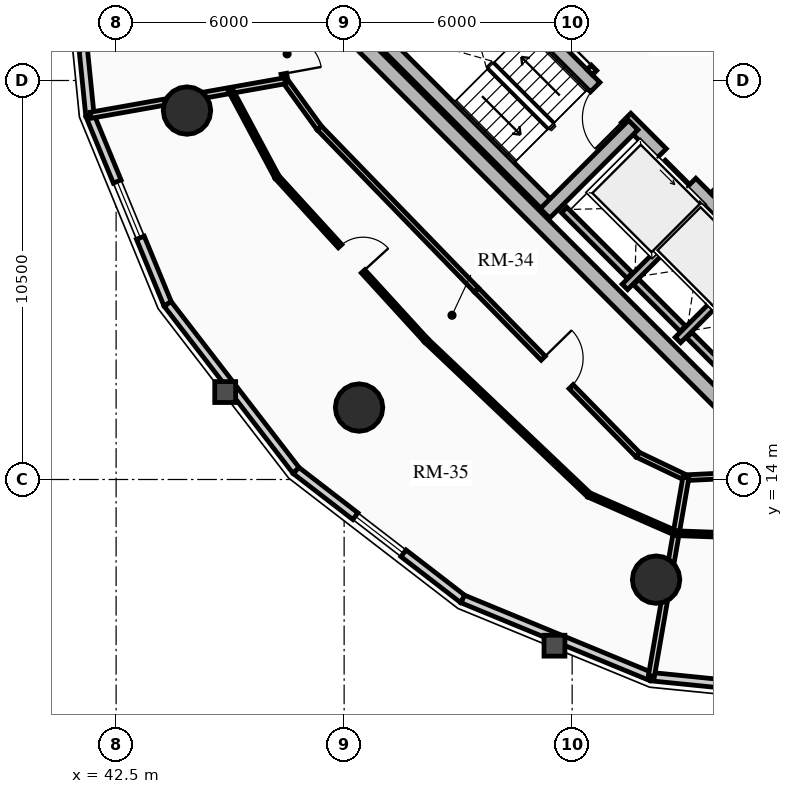
"""IFC4 building model, lengths in metres.
Left out: names, types, materials, properties, quantities, classifications, styles, units other than length and angle.
Written with IfcOpenShell. Run it as: python <this file> out.ifc"""

import sys

from ifc_helpers import new_model, si_unit, direction, frame, frame_2d, origin, origin_2d, place, context, subcontext, project, spatial, rectangle, circle, extrude, source, transform, mapped, element, fill, save


model = new_model("IFC4")
c1 = context("Model", 3, precision=1e-05, world=origin(), true_north=direction((0.0, 1.0)))
c2 = subcontext(c1, "Body", "Model", "MODEL_VIEW")
j1 = project(units=[si_unit("LENGTHUNIT", "METRE"), si_unit("PLANEANGLEUNIT", "RADIAN")], contexts=[c1])
p1 = place(None, origin())
s1 = spatial("IfcSite", under=j1, at=p1, CompositionType="ELEMENT")
p2 = place(p1, origin())
s2 = spatial("IfcBuilding", under=s1, at=p2, CompositionType="ELEMENT")
p3 = place(p2, frame((0.0, 0.0, 163.24)))
s3 = spatial("IfcBuildingStorey", under=s2, at=p3, CompositionType="ELEMENT", Elevation=163.24)
for number, where, z_axis, x_axis in (
    (1, (58.702, 15.732, 0.0), (0.0, 0.0, 1.0), (-0.707, 0.707, 0.0)),
    (2, (66.268, 23.298, 0.0), (0.0, 0.0, 1.0), (-0.707, 0.707, 0.0)),
):
    element("IfcWall", number, at=place(p3, frame(where, z_axis=z_axis, x_axis=x_axis)), inside=s3, PredefinedType="SHEAR", context=c2, shape_type="SweptSolid", body=[
        extrude(rectangle(XDim=14.1, YDim=0.4, at=frame_2d((7.05, 0.0))), origin(), (0.0, 0.0, 1.0), 2.91),
    ])
p4 = place(p3, frame((61.06, 18.373, 0.0), z_axis=(0.0, 0.0, 1.0), x_axis=(-0.707106781187, 0.707106781187, 0.0)))
e3 = element("IfcWall", 3, at=p4, inside=s3, PredefinedType="SHEAR", context=c2, shape_type="SweptSolid", body=[
    extrude(rectangle(XDim=13.7, YDim=0.35, at=frame_2d((6.85, 0.0))), origin(), (0.0, 0.0, 1.0), 2.91),
])
m1 = source(origin(), c2, "Body", "SweptSolid", [
    extrude(rectangle(XDim=1.1, YDim=2.015, at=frame_2d((0.55, 1.007))), frame((0.0, 0.185, 0.0), z_axis=(0.0, -1.0, 0.0), x_axis=(1.0, 0.0, 0.0)), (0.0, 0.0, 1.0), 0.37),
])
p5 = place(p4, frame((4.85, 0.0, 0.0)))
e4 = element("IfcOpeningElement", 4, at=p5, cuts=e3, PredefinedType="OPENING", context=c2, shape_type="MappedRepresentation", body=[
    mapped(m1, transform((0.0, 0.0, 0.0), x_axis=(1.0, 0.0, 0.0), y_axis=(0.0, 1.0, 0.0), z_axis=(0.0, 0.0, 1.0), scale=1.0)),
])
p6 = place(p4, frame((0.625, 0.0, 0.0)))
e5 = element("IfcOpeningElement", 5, at=p6, cuts=e3, PredefinedType="OPENING", context=c2, shape_type="MappedRepresentation", body=[
    mapped(m1, transform((0.0, 0.0, 0.0), x_axis=(1.0, 0.0, 0.0), y_axis=(0.0, 1.0, 0.0), z_axis=(0.0, 0.0, 1.0), scale=1.0)),
])
p7 = place(p4, frame((2.625, 0.0, 0.0)))
e6 = element("IfcOpeningElement", 6, at=p7, cuts=e3, PredefinedType="OPENING", context=c2, shape_type="MappedRepresentation", body=[
    mapped(m1, transform((0.0, 0.0, 0.0), x_axis=(1.0, 0.0, 0.0), y_axis=(0.0, 1.0, 0.0), z_axis=(0.0, 0.0, 1.0), scale=1.0)),
])
m2 = source(origin(), c2, "Body", "SweptSolid", [
    extrude(rectangle(XDim=1.15, YDim=2.02, at=frame_2d((0.575, 1.01))), frame((0.0, 0.185, 0.0), z_axis=(0.0, -1.0, 0.0), x_axis=(1.0, 0.0, 0.0)), (0.0, 0.0, 1.0), 0.37),
])
p8 = place(p4, frame((7.27, 0.0, 0.0)))
e7 = element("IfcOpeningElement", 7, at=p8, cuts=e3, PredefinedType="OPENING", context=c2, shape_type="MappedRepresentation", body=[
    mapped(m2, transform((0.0, 0.0, 0.0), x_axis=(1.0, 0.0, 0.0), y_axis=(0.0, 1.0, 0.0), z_axis=(0.0, 0.0, 1.0), scale=1.0)),
])
p9 = place(p3, frame((63.627, 20.94, 0.0), z_axis=(0.0, 0.0, 1.0), x_axis=(-0.707119496762, 0.707094065383, 0.0)))
e8 = element("IfcWall", 8, at=p9, inside=s3, PredefinedType="SHEAR", context=c2, shape_type="SweptSolid", body=[
    extrude(rectangle(XDim=9.6, YDim=0.35, at=frame_2d((4.8, 0.0))), origin(), (0.0, 0.0, 1.0), 2.91),
])
p10 = place(p9, frame((5.28, 0.0, 0.0)))
e9 = element("IfcOpeningElement", 9, at=p10, cuts=e8, PredefinedType="OPENING", context=c2, shape_type="MappedRepresentation", body=[
    mapped(m2, transform((0.0, 0.0, 0.0), x_axis=(1.0, 0.0, 0.0), y_axis=(0.0, 1.0, 0.0), z_axis=(0.0, 0.0, 1.0), scale=1.0)),
])
p11 = place(p3, frame((53.922, 21.141, 0.0), z_axis=(0.0, 0.0, 1.0), x_axis=(-0.707106781187, 0.707106781187, 0.0)))
e10 = element("IfcWall", 10, at=p11, inside=s3, PredefinedType="SHEAR", context=c2, shape_type="SweptSolid", body=[
    extrude(rectangle(XDim=6.695, YDim=0.35, at=frame_2d((3.348, 0.0))), origin(), (0.0, 0.0, 1.0), 2.91),
])
p12 = place(p3, frame((53.784, 21.003, 0.0), z_axis=(0.0, 0.0, 1.0), x_axis=(0.707106781187, 0.707106781187, 0.0)))
e11 = element("IfcWall", 11, at=p12, inside=s3, PredefinedType="SHEAR", context=c2, shape_type="SweptSolid", body=[
    extrude(rectangle(XDim=3.285, YDim=0.35, at=frame_2d((1.643, 0.0))), origin(), (0.0, 0.0, 1.0), 2.91),
])
for number, where, z_axis, x_axis in (
    (12, (44.365, 23.709, 0.0), (0.0, 0.0, 1.0), (1.0, 0.0, 0.0)),
    (13, (48.893, 15.893, 0.0), (0.0, 0.0, 1.0), (1.0, 0.0, 0.0)),
    (14, (56.709, 11.365, 0.0), (0.0, 0.0, 1.0), (1.0, 0.0, 0.0)),
):
    element("IfcColumn", number, at=place(p3, frame(where, z_axis=z_axis, x_axis=x_axis)), inside=s3, PredefinedType="USERDEFINED", context=c2, shape_type="SweptSolid", body=[
        extrude(circle(Radius=0.625, at=origin_2d()), origin(), (0.0, 0.0, 1.0), 2.91),
    ])
p13 = place(p3, frame((41.811, 23.582, 0.0), z_axis=(0.0, 0.0, 1.0), x_axis=(-0.100279889424, 0.994959267396, 0.0)))
e15 = element("IfcWall", 15, at=p13, inside=s3, PredefinedType="SOLIDWALL", context=c2, shape_type="SweptSolid", body=[
    extrude(rectangle(XDim=5.076, YDim=0.22, at=frame_2d((2.538, 0.0))), origin(), (0.0, 0.0, 1.0), 2.245),
])
m3 = source(origin(), c2, "Body", "SweptSolid", [
    extrude(rectangle(XDim=1.6, YDim=1.3, at=frame_2d((0.8, 0.65))), frame((0.0, 0.12, 0.0), z_axis=(0.0, -1.0, 0.0), x_axis=(1.0, 0.0, 0.0)), (0.0, 0.0, 1.0), 0.24),
])
p14 = place(p13, frame((1.738, 0.0, 0.65)))
e16 = element("IfcOpeningElement", 16, at=p14, cuts=e15, PredefinedType="OPENING", context=c2, shape_type="MappedRepresentation", body=[
    mapped(m3, transform((0.0, 0.0, 0.0), x_axis=(1.0, 0.0, 0.0), y_axis=(0.0, 1.0, 0.0), z_axis=(0.0, 0.0, 1.0), scale=1.0)),
])
p15 = place(p3, frame((43.856, 18.622, 0.0), z_axis=(0.0, 0.0, 1.0), x_axis=(-0.38111364655, 0.924528197738, 0.0)))
e17 = element("IfcWall", 17, at=p15, inside=s3, PredefinedType="SOLIDWALL", context=c2, shape_type="SweptSolid", body=[
    extrude(rectangle(XDim=5.366, YDim=0.22, at=frame_2d((2.683, 0.0))), origin(), (0.0, 0.0, 1.0), 2.245),
])
p16 = place(p15, frame((1.883, 0.0, 0.65)))
e18 = element("IfcOpeningElement", 18, at=p16, cuts=e17, PredefinedType="OPENING", context=c2, shape_type="MappedRepresentation", body=[
    mapped(m3, transform((0.0, 0.0, 0.0), x_axis=(1.0, 0.0, 0.0), y_axis=(0.0, 1.0, 0.0), z_axis=(0.0, 0.0, 1.0), scale=1.0)),
])
p17 = place(p3, frame((47.236, 14.236, 0.0), z_axis=(0.0, 0.0, 1.0), x_axis=(-0.610543584779, 0.791982658323, 0.0)))
e19 = element("IfcWall", 19, at=p17, inside=s3, PredefinedType="SOLIDWALL", context=c2, shape_type="SweptSolid", body=[
    extrude(rectangle(XDim=5.537, YDim=0.22, at=frame_2d((2.769, 0.0))), origin(), (0.0, 0.0, 1.0), 2.245),
])
p18 = place(p3, frame((51.622, 10.856, 0.0), z_axis=(0.0, 0.0, 1.0), x_axis=(-0.791982658323, 0.610543584779, 0.0)))
e20 = element("IfcWall", 20, at=p18, inside=s3, PredefinedType="SOLIDWALL", context=c2, shape_type="SweptSolid", body=[
    extrude(rectangle(XDim=5.537, YDim=0.22, at=frame_2d((2.769, 0.0))), origin(), (0.0, 0.0, 1.0), 2.245),
])
p19 = place(p18, frame((1.968, 0.0, 0.65)))
e21 = element("IfcOpeningElement", 21, at=p19, cuts=e20, PredefinedType="OPENING", context=c2, shape_type="MappedRepresentation", body=[
    mapped(m3, transform((0.0, 0.0, 0.0), x_axis=(1.0, 0.0, 0.0), y_axis=(0.0, 1.0, 0.0), z_axis=(0.0, 0.0, 1.0), scale=1.0)),
])
p20 = place(p3, frame((56.582, 8.811, 0.0), z_axis=(0.0, 0.0, 1.0), x_axis=(-0.924528197738, 0.38111364655, 0.0)))
e22 = element("IfcWall", 22, at=p20, inside=s3, PredefinedType="SOLIDWALL", context=c2, shape_type="SweptSolid", body=[
    extrude(rectangle(XDim=5.366, YDim=0.22, at=frame_2d((2.683, 0.0))), origin(), (0.0, 0.0, 1.0), 2.245),
])
p21 = place(p3, frame((61.633, 8.302, 0.0), z_axis=(0.0, 0.0, 1.0), x_axis=(-0.994959267396, 0.100279889424, 0.0)))
e23 = element("IfcWall", 23, at=p21, inside=s3, PredefinedType="SOLIDWALL", context=c2, shape_type="SweptSolid", body=[
    extrude(rectangle(XDim=5.076, YDim=0.22, at=frame_2d((2.538, 0.0))), origin(), (0.0, 0.0, 1.0), 2.245),
])
p22 = place(p21, frame((1.738, 0.0, 0.65)))
e24 = element("IfcOpeningElement", 24, at=p22, cuts=e23, PredefinedType="OPENING", context=c2, shape_type="MappedRepresentation", body=[
    mapped(m3, transform((0.0, 0.0, 0.0), x_axis=(1.0, 0.0, 0.0), y_axis=(0.0, 1.0, 0.0), z_axis=(0.0, 0.0, 1.0), scale=1.0)),
])
p23 = place(p3, frame((55.888, 19.069, 0.0), z_axis=(0.0, 0.0, 1.0), x_axis=(0.707106781187, 0.707106781187, 0.0)))
e25 = element("IfcWall", 25, at=p23, inside=s3, PredefinedType="SHEAR", context=c2, shape_type="SweptSolid", body=[
    extrude(rectangle(XDim=2.97, YDim=0.2, at=frame_2d((1.485, 0.0))), origin(), (0.0, 0.0, 1.0), 2.91),
])
p24 = place(p3, frame((56.015, 19.366, 0.0), z_axis=(0.0, 0.0, 1.0), x_axis=(-0.707106781187, 0.707106781187, 0.0)))
e26 = element("IfcWall", 26, at=p24, inside=s3, PredefinedType="SHEAR", context=c2, shape_type="SweptSolid", body=[
    extrude(rectangle(XDim=2.44, YDim=0.2, at=frame_2d((1.22, 0.0))), origin(), (0.0, 0.0, 1.0), 2.91),
])
p25 = place(p3, frame((57.284, 17.673, 0.0), z_axis=(0.0, 0.0, 1.0), x_axis=(0.707147878904, 0.70706568108, 0.0)))
e27 = element("IfcWall", 27, at=p25, inside=s3, PredefinedType="SHEAR", context=c2, shape_type="SweptSolid", body=[
    extrude(rectangle(XDim=2.97, YDim=0.2, at=frame_2d((1.485, 0.0))), origin(), (0.0, 0.0, 1.0), 2.91),
])
p26 = place(p3, frame((57.412, 17.97, 0.0), z_axis=(0.0, 0.0, 1.0), x_axis=(-0.707106781187, 0.707106781187, 0.0)))
e28 = element("IfcWall", 28, at=p26, inside=s3, PredefinedType="SHEAR", context=c2, shape_type="SweptSolid", body=[
    extrude(rectangle(XDim=1.735, YDim=0.2, at=frame_2d((0.867, 0.0))), origin(), (0.0, 0.0, 1.0), 2.91),
])
p27 = place(p3, frame((58.737, 16.644, 0.0), z_axis=(0.0, 0.0, 1.0), x_axis=(-0.707032117043, 0.707181437447, 0.0)))
e29 = element("IfcWall", 29, at=p27, inside=s3, PredefinedType="SHEAR", context=c2, shape_type="SweptSolid", body=[
    extrude(rectangle(XDim=1.635, YDim=0.2, at=frame_2d((0.817, 0.0))), origin(), (0.0, 0.0, 1.0), 2.91),
])
p28 = place(p3, frame((58.214, 21.467, 0.0), z_axis=(0.0, 0.0, 1.0), x_axis=(0.707106781187, 0.707106781187, 0.0)))
e30 = element("IfcWall", 30, at=p28, inside=s3, PredefinedType="PARTITIONING", context=c2, shape_type="SweptSolid", body=[
    extrude(rectangle(XDim=3.28, YDim=0.2, at=frame_2d((1.64, 0.0))), origin(), (0.0, 0.0, 1.0), 2.675),
])
m4 = source(origin(), c2, "Body", "SweptSolid", [
    extrude(rectangle(XDim=1.5, YDim=2.02, at=frame_2d((0.75, 1.01))), frame((0.0, 0.11, 0.0), z_axis=(0.0, -1.0, 0.0), x_axis=(1.0, 0.0, 0.0)), (0.0, 0.0, 1.0), 0.22),
])
p29 = place(p28, frame((1.55, 0.0, 0.0)))
e31 = element("IfcOpeningElement", 31, at=p29, cuts=e30, PredefinedType="OPENING", context=c2, shape_type="MappedRepresentation", body=[
    mapped(m4, transform((0.0, 0.0, 0.0), x_axis=(1.0, 0.0, 0.0), y_axis=(0.0, 1.0, 0.0), z_axis=(0.0, 0.0, 1.0), scale=1.0)),
])
p30 = place(p3, frame((54.961, 24.719, 0.0), z_axis=(0.0, 0.0, 1.0), x_axis=(0.707106781187, 0.707106781187, 0.0)))
e32 = element("IfcWall", 32, at=p30, inside=s3, PredefinedType="PARTITIONING", context=c2, shape_type="SweptSolid", body=[
    extrude(rectangle(XDim=3.28, YDim=0.2, at=frame_2d((1.64, 0.0))), origin(), (0.0, 0.0, 1.0), 2.675),
])
m5 = source(origin(), c2, "Body", "SweptSolid", [
    extrude(rectangle(XDim=0.9, YDim=2.005, at=frame_2d((0.45, 1.002))), frame((0.0, 0.11, 0.0), z_axis=(0.0, -1.0, 0.0), x_axis=(1.0, 0.0, 0.0)), (0.0, 0.0, 1.0), 0.22),
])
p31 = place(p30, frame((0.16, 0.0, 0.0)))
e33 = element("IfcOpeningElement", 33, at=p31, cuts=e32, PredefinedType="OPENING", context=c2, shape_type="MappedRepresentation", body=[
    mapped(m5, transform((0.0, 0.0, 0.0), x_axis=(1.0, 0.0, 0.0), y_axis=(0.0, 1.0, 0.0), z_axis=(0.0, 0.0, 1.0), scale=1.0)),
])
p32 = place(p3, frame((46.699, 25.843, 0.0), z_axis=(0.0, 0.0, 1.0), x_axis=(0.180451258011, -0.983583928032, 0.0)))
e34 = element("IfcWall", 34, at=p32, inside=s3, PredefinedType="PARTITIONING", context=c2, shape_type="SweptSolid", body=[
    extrude(rectangle(XDim=1.372, YDim=0.15, at=frame_2d((0.686, 0.0))), origin(), (0.0, 0.0, 1.0), 2.245),
])
m6 = source(origin(), c2, "Body", "SweptSolid", [
    extrude(rectangle(XDim=1.0, YDim=2.015, at=frame_2d((0.5, 1.007))), frame((0.0, 0.085, 0.0), z_axis=(0.0, -1.0, 0.0), x_axis=(1.0, 0.0, 0.0)), (0.0, 0.0, 1.0), 0.17),
])
p33 = place(p32, frame((0.186, 0.0, 0.0)))
e35 = element("IfcOpeningElement", 35, at=p33, cuts=e34, PredefinedType="OPENING", context=c2, shape_type="MappedRepresentation", body=[
    mapped(m6, transform((0.0, 0.0, 0.0), x_axis=(1.0, 0.0, 0.0), y_axis=(0.0, 1.0, 0.0), z_axis=(0.0, 0.0, 1.0), scale=1.0)),
])
p34 = place(p3, frame((46.946, 24.494, 0.0), z_axis=(0.0, 0.0, 1.0), x_axis=(0.586340262528, -0.810064871809, 0.0)))
e36 = element("IfcWall", 36, at=p34, inside=s3, PredefinedType="PARTITIONING", context=c2, shape_type="SweptSolid", body=[
    extrude(rectangle(XDim=1.531, YDim=0.15, at=frame_2d((0.766, 0.0))), origin(), (0.0, 0.0, 1.0), 2.245),
])
p35 = place(p3, frame((47.844, 23.253, 0.0), z_axis=(0.0, 0.0, 1.0), x_axis=(0.696248411352, -0.717800912293, 0.0)))
e37 = element("IfcWall", 37, at=p35, inside=s3, PredefinedType="PARTITIONING", context=c2, shape_type="SweptSolid", body=[
    extrude(rectangle(XDim=5.947, YDim=0.15, at=frame_2d((2.974, 0.0))), origin(), (0.0, 0.0, 1.0), 2.675),
])
p36 = place(p3, frame((51.985, 18.985, 0.0), z_axis=(0.0, 0.0, 1.0), x_axis=(0.699619654291, -0.714515457726, 0.0)))
e38 = element("IfcWall", 38, at=p36, inside=s3, PredefinedType="PARTITIONING", context=c2, shape_type="SweptSolid", body=[
    extrude(rectangle(XDim=6.064, YDim=0.15, at=frame_2d((3.032, 0.0))), origin(), (0.0, 0.0, 1.0), 2.245),
])
m7 = source(origin(), c2, "Body", "SweptSolid", [
    extrude(rectangle(XDim=1.05, YDim=2.015, at=frame_2d((0.525, 1.007))), frame((0.0, 0.085, 0.0), z_axis=(0.0, -1.0, 0.0), x_axis=(1.0, 0.0, 0.0)), (0.0, 0.0, 1.0), 0.17),
])
p37 = place(p36, frame((2.507, 0.0, 0.0)))
e39 = element("IfcOpeningElement", 39, at=p37, cuts=e38, PredefinedType="OPENING", context=c2, shape_type="MappedRepresentation", body=[
    mapped(m7, transform((0.0, 0.0, 0.0), x_axis=(1.0, 0.0, 0.0), y_axis=(0.0, 1.0, 0.0), z_axis=(0.0, 0.0, 1.0), scale=1.0)),
])
p38 = place(p3, frame((56.227, 14.652, 0.0), z_axis=(0.0, 0.0, 1.0), x_axis=(0.902364039563, -0.430974639745, 0.0)))
e40 = element("IfcWall", 40, at=p38, inside=s3, PredefinedType="PARTITIONING", context=c2, shape_type="SweptSolid", body=[
    extrude(rectangle(XDim=1.401, YDim=0.15, at=frame_2d((0.701, 0.0))), origin(), (0.0, 0.0, 1.0), 2.245),
])
p39 = place(p3, frame((57.492, 14.048, 0.0), z_axis=(0.0, 0.0, 1.0), x_axis=(0.99885011351, 0.047942160364, 0.0)))
e41 = element("IfcWall", 41, at=p39, inside=s3, PredefinedType="PARTITIONING", context=c2, shape_type="SweptSolid", body=[
    extrude(rectangle(XDim=1.477, YDim=0.15, at=frame_2d((0.738, 0.0))), origin(), (0.0, 0.0, 1.0), 2.245),
])
p40 = place(p3, frame((46.946, 24.494, 0.0), z_axis=(0.0, 0.0, 1.0), x_axis=(-0.984604227647, -0.174798497988, 0.0)))
e42 = element("IfcWall", 42, at=p40, inside=s3, PredefinedType="PARTITIONING", context=c2, shape_type="SweptSolid", body=[
    extrude(rectangle(XDim=5.196, YDim=0.16, at=frame_2d((2.598, 0.0))), origin(), (0.0, 0.0, 1.0), 2.245),
])
p41 = place(p3, frame((57.492, 14.048, 0.0), z_axis=(0.0, 0.0, 1.0), x_axis=(-0.171191349619, -0.985237799628, 0.0)))
e43 = element("IfcWall", 43, at=p41, inside=s3, PredefinedType="PARTITIONING", context=c2, shape_type="SweptSolid", body=[
    extrude(rectangle(XDim=5.295, YDim=0.16, at=frame_2d((2.647, 0.0))), origin(), (0.0, 0.0, 1.0), 2.245),
])
p42 = place(p3, frame((45.514, 24.239, 0.0), z_axis=(0.0, 0.0, 1.0), x_axis=(0.471225296528, -0.882012879674, 0.0)))
e44 = element("IfcWall", 44, at=p42, inside=s3, PredefinedType="PARTITIONING", context=c2, shape_type="SweptSolid", body=[
    extrude(rectangle(XDim=2.585, YDim=0.125, at=frame_2d((1.292, 0.0))), origin(), (0.0, 0.0, 1.0), 2.245),
])
p43 = place(p3, frame((46.732, 21.959, 0.0), z_axis=(0.0, 0.0, 1.0), x_axis=(0.674328014222, -0.738431939474, 0.0)))
e45 = element("IfcWall", 45, at=p43, inside=s3, PredefinedType="PARTITIONING", context=c2, shape_type="SweptSolid", body=[
    extrude(rectangle(XDim=5.823, YDim=0.125, at=frame_2d((2.912, 0.0))), origin(), (0.0, 0.0, 1.0), 2.675),
])
m8 = source(origin(), c2, "Body", "SweptSolid", [
    extrude(rectangle(XDim=0.9, YDim=2.005, at=frame_2d((0.45, 1.002))), frame((0.0, 0.073, 0.0), z_axis=(0.0, -1.0, 0.0), x_axis=(1.0, 0.0, 0.0)), (0.0, 0.0, 1.0), 0.145),
])
p44 = place(p43, frame((2.462, 0.0, 0.0)))
e46 = element("IfcOpeningElement", 46, at=p44, cuts=e45, PredefinedType="OPENING", context=c2, shape_type="MappedRepresentation", body=[
    mapped(m8, transform((0.0, 0.0, 0.0), x_axis=(1.0, 0.0, 0.0), y_axis=(0.0, 1.0, 0.0), z_axis=(0.0, 0.0, 1.0), scale=1.0)),
])
p45 = place(p3, frame((50.659, 17.659, 0.0), z_axis=(0.0, 0.0, 1.0), x_axis=(0.72516873678, -0.688571204159, 0.0)))
e47 = element("IfcWall", 47, at=p45, inside=s3, PredefinedType="PARTITIONING", context=c2, shape_type="SweptSolid", body=[
    extrude(rectangle(XDim=5.904, YDim=0.125, at=frame_2d((2.952, 0.0))), origin(), (0.0, 0.0, 1.0), 2.245),
])
p46 = place(p3, frame((54.94, 13.594, 0.0), z_axis=(0.0, 0.0, 1.0), x_axis=(0.915898070967, -0.401410916143, 0.0)))
e48 = element("IfcWall", 48, at=p46, inside=s3, PredefinedType="PARTITIONING", context=c2, shape_type="SweptSolid", body=[
    extrude(rectangle(XDim=2.509, YDim=0.125, at=frame_2d((1.254, 0.0))), origin(), (0.0, 0.0, 1.0), 2.245),
])
p47 = place(p3, frame((57.238, 12.587, 0.0), z_axis=(0.0, 0.0, 1.0), x_axis=(0.999316318576, -0.036971548882, 0.0)))
e49 = element("IfcWall", 49, at=p47, inside=s3, PredefinedType="PARTITIONING", context=c2, shape_type="SweptSolid", body=[
    extrude(rectangle(XDim=2.476, YDim=0.125, at=frame_2d((1.238, 0.0))), origin(), (0.0, 0.0, 1.0), 2.245),
])
m9 = source(origin(), c2, "Body", "SweptSolid", [
    extrude(rectangle(XDim=1.6, YDim=1.3, at=frame_2d((0.8, 0.65))), frame((0.0, 0.03, 0.0), z_axis=(0.0, -1.0, 0.0), x_axis=(1.0, 0.0, 0.0)), (0.0, 0.0, 1.0), 0.06),
])
p48 = place(p16, origin())
e50 = element("IfcWindow", 50, at=p48, inside=s3, PartitioningType="SINGLE_PANEL", PredefinedType="WINDOW", context=c2, shape_type="MappedRepresentation", body=[
    mapped(m9, transform((0.0, 0.0, 0.0), x_axis=(1.0, 0.0, 0.0), y_axis=(0.0, 1.0, 0.0), z_axis=(0.0, 0.0, 1.0), scale=1.0)),
])
fill(e18, e50)
p49 = place(p19, origin())
e51 = element("IfcWindow", 51, at=p49, inside=s3, PartitioningType="SINGLE_PANEL", PredefinedType="WINDOW", context=c2, shape_type="MappedRepresentation", body=[
    mapped(m9, transform((0.0, 0.0, 0.0), x_axis=(1.0, 0.0, 0.0), y_axis=(0.0, 1.0, 0.0), z_axis=(0.0, 0.0, 1.0), scale=1.0)),
])
fill(e21, e51)
m10 = source(origin(), c2, "Body", "SweptSolid", [
    extrude(rectangle(XDim=1.1, YDim=2.015, at=frame_2d((0.55, 1.007))), frame((0.0, 0.025, 0.0), z_axis=(0.0, -1.0, 0.0), x_axis=(1.0, 0.0, 0.0)), (0.0, 0.0, 1.0), 0.05),
])
p50 = place(p5, origin())
e52 = element("IfcDoor", 52, at=p50, inside=s3, OperationType="SLIDING_TO_LEFT", PredefinedType="DOOR", context=c2, shape_type="MappedRepresentation", body=[
    mapped(m10, transform((0.0, 0.0, 0.0), x_axis=(1.0, 0.0, 0.0), y_axis=(0.0, 1.0, 0.0), z_axis=(0.0, 0.0, 1.0), scale=1.0)),
])
fill(e4, e52)
m11 = source(origin(), c2, "Body", "SweptSolid", [
    extrude(rectangle(XDim=1.15, YDim=2.02, at=frame_2d((0.575, 1.01))), frame((0.0, 0.025, 0.0), z_axis=(0.0, -1.0, 0.0), x_axis=(1.0, 0.0, 0.0)), (0.0, 0.0, 1.0), 0.05),
])
p51 = place(p8, origin())
e53 = element("IfcDoor", 53, at=p51, inside=s3, OperationType="SINGLE_SWING_LEFT", PredefinedType="DOOR", context=c2, shape_type="MappedRepresentation", body=[
    mapped(m11, transform((0.0, 0.0, 0.0), x_axis=(1.0, 0.0, 0.0), y_axis=(0.0, 1.0, 0.0), z_axis=(0.0, 0.0, 1.0), scale=1.0)),
])
fill(e7, e53)
m12 = source(origin(), c2, "Body", "SweptSolid", [
    extrude(rectangle(XDim=0.9, YDim=2.005, at=frame_2d((0.45, 1.002))), frame((0.0, 0.025, 0.0), z_axis=(0.0, -1.0, 0.0), x_axis=(1.0, 0.0, 0.0)), (0.0, 0.0, 1.0), 0.05),
])
p52 = place(p31, origin())
e54 = element("IfcDoor", 54, at=p52, inside=s3, OperationType="SINGLE_SWING_LEFT", PredefinedType="DOOR", context=c2, shape_type="MappedRepresentation", body=[
    mapped(m12, transform((0.0, 0.0, 0.0), x_axis=(1.0, 0.0, 0.0), y_axis=(0.0, 1.0, 0.0), z_axis=(0.0, 0.0, 1.0), scale=1.0)),
])
fill(e33, e54)
m13 = source(origin(), c2, "Body", "SweptSolid", [
    extrude(rectangle(XDim=1.0, YDim=2.015, at=frame_2d((0.5, 1.007))), frame((0.0, 0.025, 0.0), z_axis=(0.0, -1.0, 0.0), x_axis=(1.0, 0.0, 0.0)), (0.0, 0.0, 1.0), 0.05),
])
p53 = place(p33, origin())
e55 = element("IfcDoor", 55, at=p53, inside=s3, OperationType="SINGLE_SWING_RIGHT", PredefinedType="DOOR", context=c2, shape_type="MappedRepresentation", body=[
    mapped(m13, transform((0.0, 0.0, 0.0), x_axis=(1.0, 0.0, 0.0), y_axis=(0.0, 1.0, 0.0), z_axis=(0.0, 0.0, 1.0), scale=1.0)),
])
fill(e35, e55)
m14 = source(origin(), c2, "Body", "SweptSolid", [
    extrude(rectangle(XDim=1.05, YDim=2.015, at=frame_2d((0.525, 1.007))), frame((0.0, 0.025, 0.0), z_axis=(0.0, -1.0, 0.0), x_axis=(1.0, 0.0, 0.0)), (0.0, 0.0, 1.0), 0.05),
])
p54 = place(p37, origin())
e56 = element("IfcDoor", 56, at=p54, inside=s3, OperationType="SINGLE_SWING_LEFT", PredefinedType="DOOR", context=c2, shape_type="MappedRepresentation", body=[
    mapped(m14, transform((0.0, 0.0, 0.0), x_axis=(1.0, 0.0, 0.0), y_axis=(0.0, 1.0, 0.0), z_axis=(0.0, 0.0, 1.0), scale=1.0)),
])
fill(e39, e56)
p55 = place(p44, origin())
e57 = element("IfcDoor", 57, at=p55, inside=s3, OperationType="SINGLE_SWING_RIGHT", PredefinedType="DOOR", context=c2, shape_type="MappedRepresentation", body=[
    mapped(m12, transform((0.0, 0.0, 0.0), x_axis=(1.0, 0.0, 0.0), y_axis=(0.0, 1.0, 0.0), z_axis=(0.0, 0.0, 1.0), scale=1.0)),
])
fill(e46, e57)
save(model, sys.argv[1])
